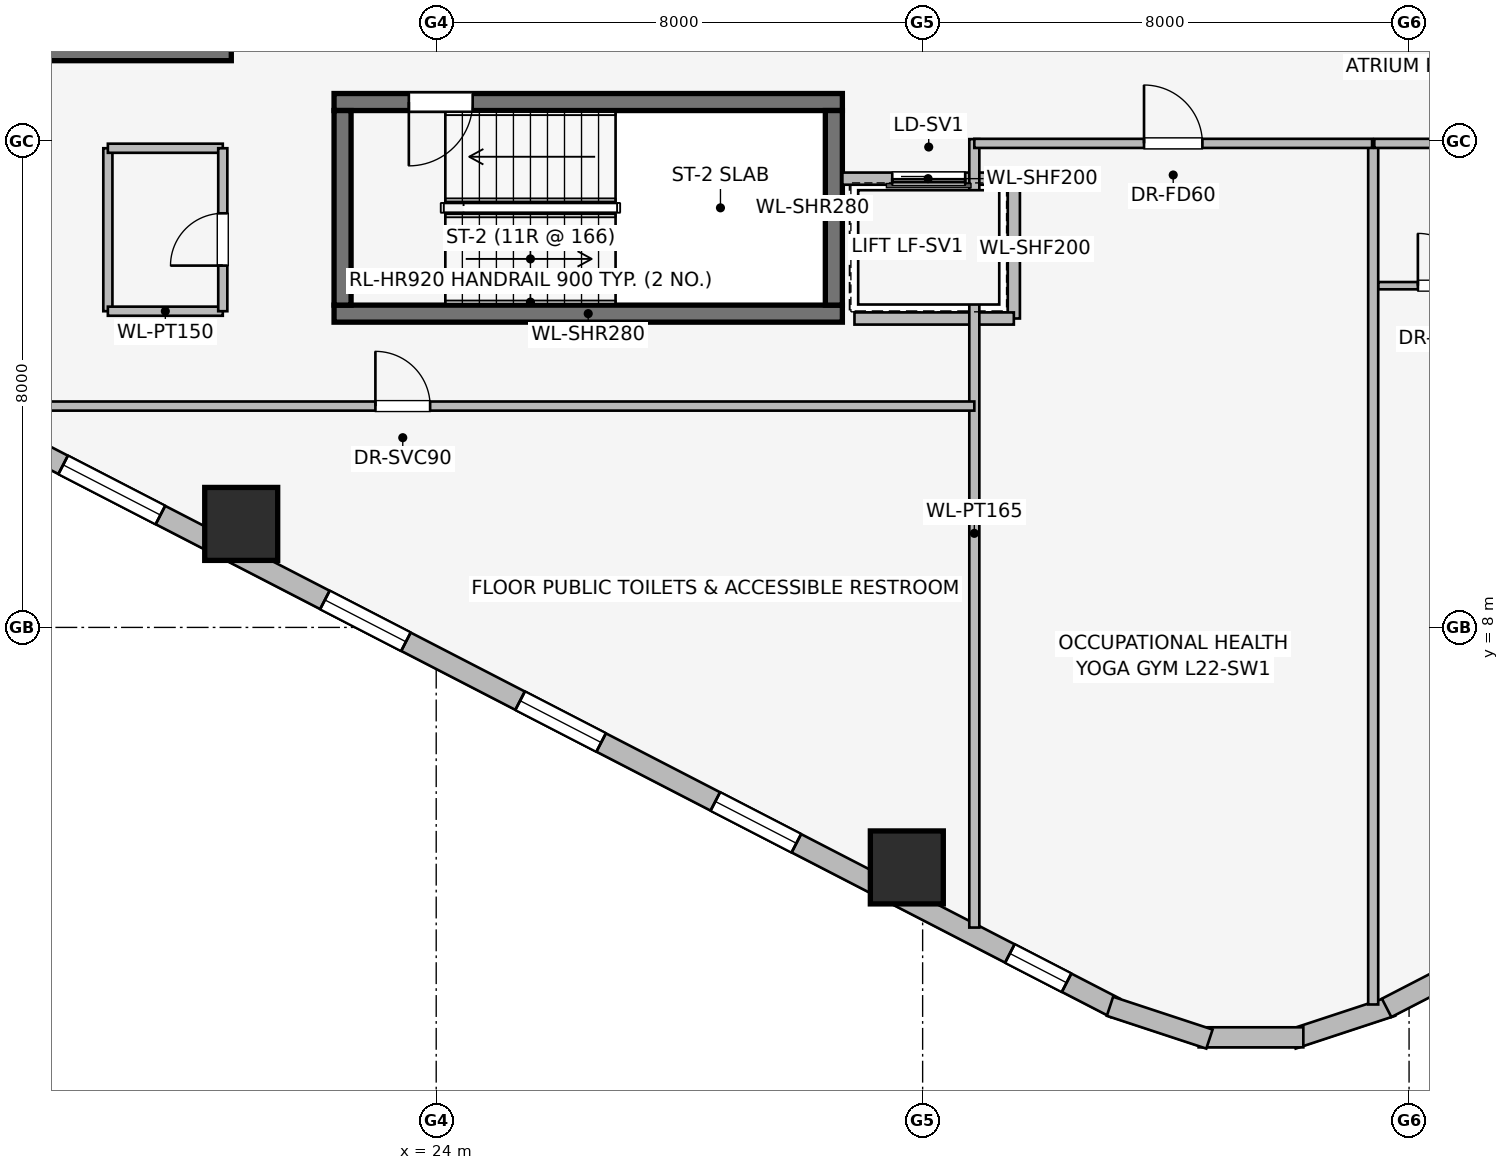
"""IFC4 building model, lengths in metres.
Left out: names, types, materials, properties, quantities, classifications, styles, units other than length and angle.
Written with IfcOpenShell. Run it as: python <this file> out.ifc"""

import sys

from ifc_helpers import new_model, si_unit, direction, frame, frame_2d, origin, origin_2d, place, context, subcontext, project, spatial, rectangle, extrude, element, fill, save


model = new_model("IFC4")
c1 = context("Model", 3, precision=1e-05, world=origin(), true_north=direction((0.0, 1.0)))
c2 = subcontext(c1, "Body", "Model", "MODEL_VIEW")
j1 = project(units=[si_unit("LENGTHUNIT", "METRE"), si_unit("PLANEANGLEUNIT", "RADIAN")], contexts=[c1])
p1 = place(None, origin())
s1 = spatial("IfcSite", under=j1, at=p1, CompositionType="ELEMENT")
p2 = place(p1, origin())
s2 = spatial("IfcBuilding", under=s1, at=p2, CompositionType="ELEMENT")
p3 = place(p2, frame((0.0, 0.0, 85.4)))
s3 = spatial("IfcBuildingStorey", under=s2, at=p3, CompositionType="ELEMENT", Elevation=85.4)
p4 = place(p3, frame((16.87, 17.46, 0.0), z_axis=(0.0, 0.0, 1.0), x_axis=(1.0, 0.0, 0.0)))
e1 = element("IfcWall", 1, at=p4, inside=s3, PredefinedType="SHEAR", context=c2, shape_type="SweptSolid", body=[
    extrude(rectangle(XDim=3.76, YDim=0.28, at=frame_2d((1.88, 0.0))), origin(), (0.0, 0.0, 1.0), 3.65),
])
p5 = place(p3, frame((22.32, 13.16, 0.0), z_axis=(0.0, 0.0, 1.0), x_axis=(1.0, 0.0, 0.0)))
e2 = element("IfcWall", 2, at=p5, inside=s3, PredefinedType="SHEAR", context=c2, shape_type="SweptSolid", body=[
    extrude(rectangle(XDim=8.36, YDim=0.28, at=frame_2d((4.18, 0.0))), origin(), (0.0, 0.0, 1.0), 3.65),
])
p6 = place(p3, frame((30.68, 16.64, 0.0), z_axis=(0.0, 0.0, 1.0), x_axis=(-1.0, 0.0, 0.0)))
e3 = element("IfcWall", 3, at=p6, inside=s3, PredefinedType="SHEAR", context=c2, shape_type="SweptSolid", body=[
    extrude(rectangle(XDim=8.36, YDim=0.28, at=frame_2d((4.18, 0.0))), origin(), (0.0, 0.0, 1.0), 3.65),
])
p7 = place(p6, frame((6.08, 0.0, 0.0)))
e4 = element("IfcOpeningElement", 4, at=p7, cuts=e3, PredefinedType="OPENING", context=c2, shape_type="SweptSolid", body=[
    extrude(rectangle(XDim=1.05, YDim=2.0, at=frame_2d((0.525, 1.0))), frame((0.0, 0.15, 0.0), z_axis=(0.0, -1.0, 0.0), x_axis=(1.0, 0.0, 0.0)), (0.0, 0.0, 1.0), 0.3),
])
for number, where, z_axis, x_axis in (
    (5, (22.46, 16.5, 0.0), (0.0, 0.0, 1.0), (0.0, -1.0, 0.0)),
    (6, (30.54, 13.3, 0.0), (0.0, 0.0, 1.0), (0.0, 1.0, 0.0)),
):
    element("IfcWall", number, at=place(p3, frame(where, z_axis=z_axis, x_axis=x_axis)), inside=s3, PredefinedType="SHEAR", context=c2, shape_type="SweptSolid", body=[
        extrude(rectangle(XDim=3.2, YDim=0.28, at=frame_2d((1.6, 0.0))), origin(), (0.0, 0.0, 1.0), 3.65),
    ])
for number, where, z_axis, x_axis in (
    (7, (20.793, 9.702, 0.0), (0.0, 0.0, 1.0), (1.0, 0.0, 0.0)),
    (8, (31.74, 4.053, 0.0), (0.0, 0.0, 1.0), (1.0, 0.0, 0.0)),
):
    element("IfcColumn", number, at=place(p3, frame(where, z_axis=z_axis, x_axis=x_axis)), inside=s3, PredefinedType="COLUMN", context=c2, shape_type="SweptSolid", body=[
        extrude(rectangle(XDim=1.2, YDim=1.2, at=origin_2d()), origin(), (0.0, 0.0, 1.0), 3.65),
    ])
p8 = place(p3, frame((35.169, 1.743, 0.0), z_axis=(0.0, 0.0, 1.0), x_axis=(-0.888634413993, 0.458616264721, 0.0)))
e9 = element("IfcWall", 9, at=p8, inside=s3, PredefinedType="STANDARD", context=c2, shape_type="SweptSolid", body=[
    extrude(rectangle(XDim=20.531, YDim=0.34, at=frame_2d((10.266, 0.0))), origin(), (0.0, 0.0, 1.0), 2.684),
])
p9 = place(p8, frame((0.902, 0.0, 0.75)))
e10 = element("IfcOpeningElement", 10, at=p9, cuts=e9, PredefinedType="OPENING", context=c2, shape_type="SweptSolid", body=[
    extrude(rectangle(XDim=1.05, YDim=1.4, at=frame_2d((0.525, 0.7))), frame((0.0, 0.18, 0.0), z_axis=(0.0, -1.0, 0.0), x_axis=(1.0, 0.0, 0.0)), (0.0, 0.0, 1.0), 0.36),
])
p10 = place(p8, frame((5.903, 0.0, 0.75)))
e11 = element("IfcOpeningElement", 11, at=p10, cuts=e9, PredefinedType="OPENING", context=c2, shape_type="SweptSolid", body=[
    extrude(rectangle(XDim=1.5, YDim=1.5, at=frame_2d((0.75, 0.75))), frame((0.0, 0.18, 0.0), z_axis=(0.0, -1.0, 0.0), x_axis=(1.0, 0.0, 0.0)), (0.0, 0.0, 1.0), 0.36),
])
p11 = place(p8, frame((9.516, 0.0, 0.75)))
e12 = element("IfcOpeningElement", 12, at=p11, cuts=e9, PredefinedType="OPENING", context=c2, shape_type="SweptSolid", body=[
    extrude(rectangle(XDim=1.5, YDim=1.5, at=frame_2d((0.75, 0.75))), frame((0.0, 0.18, 0.0), z_axis=(0.0, -1.0, 0.0), x_axis=(1.0, 0.0, 0.0)), (0.0, 0.0, 1.0), 0.36),
])
p12 = place(p8, frame((13.129, 0.0, 0.75)))
e13 = element("IfcOpeningElement", 13, at=p12, cuts=e9, PredefinedType="OPENING", context=c2, shape_type="SweptSolid", body=[
    extrude(rectangle(XDim=1.5, YDim=1.5, at=frame_2d((0.75, 0.75))), frame((0.0, 0.18, 0.0), z_axis=(0.0, -1.0, 0.0), x_axis=(1.0, 0.0, 0.0)), (0.0, 0.0, 1.0), 0.36),
])
p13 = place(p8, frame((17.673, 0.0, 0.75)))
e14 = element("IfcOpeningElement", 14, at=p13, cuts=e9, PredefinedType="OPENING", context=c2, shape_type="SweptSolid", body=[
    extrude(rectangle(XDim=1.8, YDim=1.5, at=frame_2d((0.9, 0.75))), frame((0.0, 0.18, 0.0), z_axis=(0.0, -1.0, 0.0), x_axis=(1.0, 0.0, 0.0)), (0.0, 0.0, 1.0), 0.36),
])
p14 = place(p3, frame((39.719, 1.769, 0.0), z_axis=(0.0, 0.0, 1.0), x_axis=(-0.94976901097, -0.312951794691, 0.0)))
e15 = element("IfcWall", 15, at=p14, inside=s3, PredefinedType="STANDARD", context=c2, shape_type="SweptSolid", body=[
    extrude(rectangle(XDim=1.722, YDim=0.33, at=frame_2d((0.861, 0.0))), origin(), (0.0, 0.0, 1.0), 3.39),
])
p15 = place(p3, frame((38.261, 1.259, 0.0), z_axis=(0.0, 0.0, 1.0), x_axis=(-1.0, 0.0, 0.0)))
e16 = element("IfcWall", 16, at=p15, inside=s3, PredefinedType="STANDARD", context=c2, shape_type="SweptSolid", body=[
    extrude(rectangle(XDim=1.722, YDim=0.33, at=frame_2d((0.861, 0.0))), origin(), (0.0, 0.0, 1.0), 3.39),
])
p16 = place(p3, frame((36.717, 1.23, 0.0), z_axis=(0.0, 0.0, 1.0), x_axis=(-0.94976901097, 0.312951794691, 0.0)))
e17 = element("IfcWall", 17, at=p16, inside=s3, PredefinedType="STANDARD", context=c2, shape_type="SweptSolid", body=[
    extrude(rectangle(XDim=1.722, YDim=0.33, at=frame_2d((0.861, 0.0))), origin(), (0.0, 0.0, 1.0), 3.39),
])
p17 = place(p3, frame((57.876, 11.159, 0.0), z_axis=(0.0, 0.0, 1.0), x_axis=(-0.888634413993, -0.458616264721, 0.0)))
e18 = element("IfcWall", 18, at=p17, inside=s3, PredefinedType="STANDARD", context=c2, shape_type="SweptSolid", body=[
    extrude(rectangle(XDim=20.531, YDim=0.34, at=frame_2d((10.266, 0.0))), origin(), (0.0, 0.0, 1.0), 2.684),
])
p18 = place(p17, frame((1.058, 0.0, 0.75)))
e19 = element("IfcOpeningElement", 19, at=p18, cuts=e18, PredefinedType="OPENING", context=c2, shape_type="SweptSolid", body=[
    extrude(rectangle(XDim=1.8, YDim=1.5, at=frame_2d((0.9, 0.75))), frame((0.0, 0.18, 0.0), z_axis=(0.0, -1.0, 0.0), x_axis=(1.0, 0.0, 0.0)), (0.0, 0.0, 1.0), 0.36),
])
p19 = place(p17, frame((5.703, 0.0, 0.75)))
e20 = element("IfcOpeningElement", 20, at=p19, cuts=e18, PredefinedType="OPENING", context=c2, shape_type="SweptSolid", body=[
    extrude(rectangle(XDim=1.5, YDim=1.5, at=frame_2d((0.75, 0.75))), frame((0.0, 0.18, 0.0), z_axis=(0.0, -1.0, 0.0), x_axis=(1.0, 0.0, 0.0)), (0.0, 0.0, 1.0), 0.36),
])
p20 = place(p17, frame((8.099, 0.0, 0.75)))
e21 = element("IfcOpeningElement", 21, at=p20, cuts=e18, PredefinedType="OPENING", context=c2, shape_type="SweptSolid", body=[
    extrude(rectangle(XDim=1.5, YDim=1.5, at=frame_2d((0.75, 0.75))), frame((0.0, 0.18, 0.0), z_axis=(0.0, -1.0, 0.0), x_axis=(1.0, 0.0, 0.0)), (0.0, 0.0, 1.0), 0.36),
])
p21 = place(p17, frame((10.495, 0.0, 0.75)))
e22 = element("IfcOpeningElement", 22, at=p21, cuts=e18, PredefinedType="OPENING", context=c2, shape_type="SweptSolid", body=[
    extrude(rectangle(XDim=1.5, YDim=1.5, at=frame_2d((0.75, 0.75))), frame((0.0, 0.18, 0.0), z_axis=(0.0, -1.0, 0.0), x_axis=(1.0, 0.0, 0.0)), (0.0, 0.0, 1.0), 0.36),
])
p22 = place(p17, frame((13.526, 0.0, 0.75)))
e23 = element("IfcOpeningElement", 23, at=p22, cuts=e18, PredefinedType="OPENING", context=c2, shape_type="SweptSolid", body=[
    extrude(rectangle(XDim=1.8, YDim=1.5, at=frame_2d((0.9, 0.75))), frame((0.0, 0.18, 0.0), z_axis=(0.0, -1.0, 0.0), x_axis=(1.0, 0.0, 0.0)), (0.0, 0.0, 1.0), 0.36),
])
p23 = place(p17, frame((17.823, 0.0, 0.75)))
e24 = element("IfcOpeningElement", 24, at=p23, cuts=e18, PredefinedType="OPENING", context=c2, shape_type="SweptSolid", body=[
    extrude(rectangle(XDim=1.5, YDim=1.5, at=frame_2d((0.75, 0.75))), frame((0.0, 0.18, 0.0), z_axis=(0.0, -1.0, 0.0), x_axis=(1.0, 0.0, 0.0)), (0.0, 0.0, 1.0), 0.36),
])
p24 = place(p3, frame((33.5, 15.38, 0.0), z_axis=(0.0, 0.0, 1.0), x_axis=(-1.0, 0.0, 0.0)))
e25 = element("IfcWall", 25, at=p24, inside=s3, PredefinedType="PARTITIONING", context=c2, shape_type="SweptSolid", body=[
    extrude(rectangle(XDim=2.82, YDim=0.2, at=frame_2d((1.41, 0.0))), origin(), (0.0, 0.0, 1.0), 3.39),
])
p25 = place(p24, frame((0.8, 0.0, 0.0)))
e26 = element("IfcOpeningElement", 26, at=p25, cuts=e25, PredefinedType="OPENING", context=c2, shape_type="SweptSolid", body=[
    extrude(rectangle(XDim=1.2, YDim=2.2, at=frame_2d((0.6, 1.1))), frame((0.0, 0.11, 0.0), z_axis=(0.0, -1.0, 0.0), x_axis=(1.0, 0.0, 0.0)), (0.0, 0.0, 1.0), 0.22),
])
p26 = place(p3, frame((33.5, 13.08, 0.0), z_axis=(0.0, 0.0, 1.0), x_axis=(0.0, 1.0, 0.0)))
e27 = element("IfcWall", 27, at=p26, inside=s3, PredefinedType="PARTITIONING", context=c2, shape_type="SweptSolid", body=[
    extrude(rectangle(XDim=2.3, YDim=0.2, at=frame_2d((1.15, 0.0))), origin(), (0.0, 0.0, 1.0), 3.39),
])
p27 = place(p3, frame((30.879, 13.08, 0.0), z_axis=(0.0, 0.0, 1.0), x_axis=(1.0, 0.0, 0.0)))
e28 = element("IfcWall", 28, at=p27, inside=s3, PredefinedType="PARTITIONING", context=c2, shape_type="SweptSolid", body=[
    extrude(rectangle(XDim=2.621, YDim=0.2, at=frame_2d((1.311, 0.0))), origin(), (0.0, 0.0, 1.0), 3.39),
])
p28 = place(p3, frame((18.6, 15.88, 0.0), z_axis=(0.0, 0.0, 1.0), x_axis=(0.0, -1.0, 0.0)))
e29 = element("IfcWall", 29, at=p28, inside=s3, PredefinedType="PARTITIONING", context=c2, shape_type="SweptSolid", body=[
    extrude(rectangle(XDim=2.68, YDim=0.15, at=frame_2d((1.34, 0.0))), origin(), (0.0, 0.0, 1.0), 3.39),
])
for number, where, z_axis, x_axis in (
    (30, (18.6, 13.2, 0.0), (0.0, 0.0, 1.0), (1.0, 0.0, 0.0)),
    (31, (18.6, 15.88, 0.0), (0.0, 0.0, 1.0), (1.0, 0.0, 0.0)),
):
    element("IfcWall", number, at=place(p3, frame(where, z_axis=z_axis, x_axis=x_axis)), inside=s3, PredefinedType="PARTITIONING", context=c2, shape_type="SweptSolid", body=[
        extrude(rectangle(XDim=1.89, YDim=0.15, at=frame_2d((0.945, 0.0))), origin(), (0.0, 0.0, 1.0), 3.39),
    ])
p29 = place(p3, frame((20.49, 13.2, 0.0), z_axis=(0.0, 0.0, 1.0), x_axis=(0.0, 1.0, 0.0)))
e32 = element("IfcWall", 32, at=p29, inside=s3, PredefinedType="PARTITIONING", context=c2, shape_type="SweptSolid", body=[
    extrude(rectangle(XDim=2.68, YDim=0.15, at=frame_2d((1.34, 0.0))), origin(), (0.0, 0.0, 1.0), 3.39),
])
p30 = place(p29, frame((0.75, 0.0, 0.0)))
e33 = element("IfcOpeningElement", 33, at=p30, cuts=e32, PredefinedType="OPENING", context=c2, shape_type="SweptSolid", body=[
    extrude(rectangle(XDim=0.86, YDim=2.0, at=frame_2d((0.43, 1.0))), frame((0.0, 0.085, 0.0), z_axis=(0.0, -1.0, 0.0), x_axis=(1.0, 0.0, 0.0)), (0.0, 0.0, 1.0), 0.17),
])
p31 = place(p3, frame((32.85, 3.064, 0.0), z_axis=(0.0, 0.0, 1.0), x_axis=(0.0, 1.0, 0.0)))
e34 = element("IfcWall", 34, at=p31, inside=s3, PredefinedType="PARTITIONING", context=c2, shape_type="SweptSolid", body=[
    extrude(rectangle(XDim=12.966, YDim=0.165, at=frame_2d((6.483, 0.0))), origin(), (0.0, 0.0, 1.0), 3.39),
])
p32 = place(p3, frame((16.487, 11.64, 0.0), z_axis=(0.0, 0.0, 1.0), x_axis=(1.0, 0.0, 0.0)))
e35 = element("IfcWall", 35, at=p32, inside=s3, PredefinedType="PARTITIONING", context=c2, shape_type="SweptSolid", body=[
    extrude(rectangle(XDim=16.363, YDim=0.15, at=frame_2d((8.182, 0.0))), origin(), (0.0, 0.0, 1.0), 3.39),
])
p33 = place(p32, frame((6.513, 0.0, 0.0)))
e36 = element("IfcOpeningElement", 36, at=p33, cuts=e35, PredefinedType="OPENING", context=c2, shape_type="SweptSolid", body=[
    extrude(rectangle(XDim=0.9, YDim=2.0, at=frame_2d((0.45, 1.0))), frame((0.0, 0.085, 0.0), z_axis=(0.0, -1.0, 0.0), x_axis=(1.0, 0.0, 0.0)), (0.0, 0.0, 1.0), 0.17),
])
p34 = place(p3, frame((39.41, 1.799, 0.0), z_axis=(0.0, 0.0, 1.0), x_axis=(0.0, 1.0, 0.0)))
e37 = element("IfcWall", 37, at=p34, inside=s3, PredefinedType="PARTITIONING", context=c2, shape_type="SweptSolid", body=[
    extrude(rectangle(XDim=14.131, YDim=0.165, at=frame_2d((7.065, 0.0))), origin(), (0.0, 0.0, 1.0), 3.39),
])
p35 = place(p3, frame((32.85, 15.96, 0.0), z_axis=(0.0, 0.0, 1.0), x_axis=(1.0, 0.0, 0.0)))
e38 = element("IfcWall", 38, at=p35, inside=s3, PredefinedType="PARTITIONING", context=c2, shape_type="SweptSolid", body=[
    extrude(rectangle(XDim=6.542, YDim=0.15, at=frame_2d((3.271, 0.0))), origin(), (0.0, 0.0, 1.0), 3.39),
])
p36 = place(p35, frame((2.791, 0.0, 0.0)))
e39 = element("IfcOpeningElement", 39, at=p36, cuts=e38, PredefinedType="OPENING", context=c2, shape_type="SweptSolid", body=[
    extrude(rectangle(XDim=0.96, YDim=2.0, at=frame_2d((0.48, 1.0))), frame((0.0, 0.085, 0.0), z_axis=(0.0, -1.0, 0.0), x_axis=(1.0, 0.0, 0.0)), (0.0, 0.0, 1.0), 0.17),
])
p37 = place(p3, frame((39.495, 13.62, 0.0), z_axis=(0.0, 0.0, 1.0), x_axis=(1.0, 0.0, 0.0)))
e40 = element("IfcWall", 40, at=p37, inside=s3, PredefinedType="PARTITIONING", context=c2, shape_type="SweptSolid", body=[
    extrude(rectangle(XDim=2.48, YDim=0.12, at=frame_2d((1.24, 0.0))), origin(), (0.0, 0.0, 1.0), 3.39),
])
p38 = place(p37, frame((0.65, 0.0, 0.0)))
e41 = element("IfcOpeningElement", 41, at=p38, cuts=e40, PredefinedType="OPENING", context=c2, shape_type="SweptSolid", body=[
    extrude(rectangle(XDim=0.86, YDim=2.0, at=frame_2d((0.43, 1.0))), frame((0.0, 0.07, 0.0), z_axis=(0.0, -1.0, 0.0), x_axis=(1.0, 0.0, 0.0)), (0.0, 0.0, 1.0), 0.14),
])
p39 = place(p3, frame((39.428, 15.96, 0.0), z_axis=(0.0, 0.0, 1.0), x_axis=(1.0, 0.0, 0.0)))
e42 = element("IfcWall", 42, at=p39, inside=s3, PredefinedType="PARTITIONING", context=c2, shape_type="SweptSolid", body=[
    extrude(rectangle(XDim=6.996, YDim=0.15, at=frame_2d((3.498, 0.0))), origin(), (0.0, 0.0, 1.0), 3.39),
])
p40 = place(p39, frame((4.153, 0.0, 0.0)))
e43 = element("IfcOpeningElement", 43, at=p40, cuts=e42, PredefinedType="OPENING", context=c2, shape_type="SweptSolid", body=[
    extrude(rectangle(XDim=0.96, YDim=2.0, at=frame_2d((0.48, 1.0))), frame((0.0, 0.085, 0.0), z_axis=(0.0, -1.0, 0.0), x_axis=(1.0, 0.0, 0.0)), (0.0, 0.0, 1.0), 0.17),
])
p41 = place(p9, origin())
e44 = element("IfcWindow", 44, at=p41, inside=s3, PartitioningType="SINGLE_PANEL", PredefinedType="WINDOW", context=c2, shape_type="SweptSolid", body=[
    extrude(rectangle(XDim=1.05, YDim=1.4, at=frame_2d((0.525, 0.7))), frame((0.0, 0.03, 0.0), z_axis=(0.0, -1.0, 0.0), x_axis=(1.0, 0.0, 0.0)), (0.0, 0.0, 1.0), 0.06),
])
fill(e10, e44)
p42 = place(p10, origin())
e45 = element("IfcWindow", 45, at=p42, inside=s3, PartitioningType="SINGLE_PANEL", PredefinedType="WINDOW", context=c2, shape_type="SweptSolid", body=[
    extrude(rectangle(XDim=1.5, YDim=1.5, at=frame_2d((0.75, 0.75))), frame((0.0, 0.03, 0.0), z_axis=(0.0, -1.0, 0.0), x_axis=(1.0, 0.0, 0.0)), (0.0, 0.0, 1.0), 0.06),
])
fill(e11, e45)
p43 = place(p11, origin())
e46 = element("IfcWindow", 46, at=p43, inside=s3, PartitioningType="SINGLE_PANEL", PredefinedType="WINDOW", context=c2, shape_type="SweptSolid", body=[
    extrude(rectangle(XDim=1.5, YDim=1.5, at=frame_2d((0.75, 0.75))), frame((0.0, 0.03, 0.0), z_axis=(0.0, -1.0, 0.0), x_axis=(1.0, 0.0, 0.0)), (0.0, 0.0, 1.0), 0.06),
])
fill(e12, e46)
p44 = place(p12, origin())
e47 = element("IfcWindow", 47, at=p44, inside=s3, PartitioningType="SINGLE_PANEL", PredefinedType="WINDOW", context=c2, shape_type="SweptSolid", body=[
    extrude(rectangle(XDim=1.5, YDim=1.5, at=frame_2d((0.75, 0.75))), frame((0.0, 0.03, 0.0), z_axis=(0.0, -1.0, 0.0), x_axis=(1.0, 0.0, 0.0)), (0.0, 0.0, 1.0), 0.06),
])
fill(e13, e47)
p45 = place(p13, origin())
e48 = element("IfcWindow", 48, at=p45, inside=s3, PartitioningType="SINGLE_PANEL", PredefinedType="WINDOW", context=c2, shape_type="SweptSolid", body=[
    extrude(rectangle(XDim=1.8, YDim=1.5, at=frame_2d((0.9, 0.75))), frame((0.0, 0.03, 0.0), z_axis=(0.0, -1.0, 0.0), x_axis=(1.0, 0.0, 0.0)), (0.0, 0.0, 1.0), 0.06),
])
fill(e14, e48)
p46 = place(p7, origin())
e49 = element("IfcDoor", 49, at=p46, inside=s3, OperationType="SINGLE_SWING_RIGHT", PredefinedType="DOOR", context=c2, shape_type="SweptSolid", body=[
    extrude(rectangle(XDim=1.05, YDim=2.0, at=frame_2d((0.525, 1.0))), frame((0.0, 0.025, 0.0), z_axis=(0.0, -1.0, 0.0), x_axis=(1.0, 0.0, 0.0)), (0.0, 0.0, 1.0), 0.05),
])
fill(e4, e49)
p47 = place(p25, origin())
e50 = element("IfcDoor", 50, at=p47, inside=s3, OperationType="SLIDING_TO_RIGHT", PredefinedType="DOOR", context=c2, shape_type="SweptSolid", body=[
    extrude(rectangle(XDim=1.2, YDim=2.2, at=frame_2d((0.6, 1.1))), frame((0.0, 0.025, 0.0), z_axis=(0.0, -1.0, 0.0), x_axis=(1.0, 0.0, 0.0)), (0.0, 0.0, 1.0), 0.05),
])
fill(e26, e50)
p48 = place(p30, origin())
e51 = element("IfcDoor", 51, at=p48, inside=s3, OperationType="SINGLE_SWING_LEFT", PredefinedType="DOOR", context=c2, shape_type="SweptSolid", body=[
    extrude(rectangle(XDim=0.86, YDim=2.0, at=frame_2d((0.43, 1.0))), frame((0.0, 0.025, 0.0), z_axis=(0.0, -1.0, 0.0), x_axis=(1.0, 0.0, 0.0)), (0.0, 0.0, 1.0), 0.05),
])
fill(e33, e51)
p49 = place(p33, origin())
e52 = element("IfcDoor", 52, at=p49, inside=s3, OperationType="SINGLE_SWING_LEFT", PredefinedType="DOOR", context=c2, shape_type="SweptSolid", body=[
    extrude(rectangle(XDim=0.9, YDim=2.0, at=frame_2d((0.45, 1.0))), frame((0.0, 0.025, 0.0), z_axis=(0.0, -1.0, 0.0), x_axis=(1.0, 0.0, 0.0)), (0.0, 0.0, 1.0), 0.05),
])
fill(e36, e52)
p50 = place(p36, origin())
e53 = element("IfcDoor", 53, at=p50, inside=s3, OperationType="SINGLE_SWING_LEFT", PredefinedType="DOOR", context=c2, shape_type="SweptSolid", body=[
    extrude(rectangle(XDim=0.96, YDim=2.0, at=frame_2d((0.48, 1.0))), frame((0.0, 0.025, 0.0), z_axis=(0.0, -1.0, 0.0), x_axis=(1.0, 0.0, 0.0)), (0.0, 0.0, 1.0), 0.05),
])
fill(e39, e53)
p51 = place(p38, origin())
e54 = element("IfcDoor", 54, at=p51, inside=s3, OperationType="SINGLE_SWING_LEFT", PredefinedType="DOOR", context=c2, shape_type="SweptSolid", body=[
    extrude(rectangle(XDim=0.86, YDim=2.0, at=frame_2d((0.43, 1.0))), frame((0.0, 0.025, 0.0), z_axis=(0.0, -1.0, 0.0), x_axis=(1.0, 0.0, 0.0)), (0.0, 0.0, 1.0), 0.05),
])
fill(e41, e54)
save(model, sys.argv[1])
